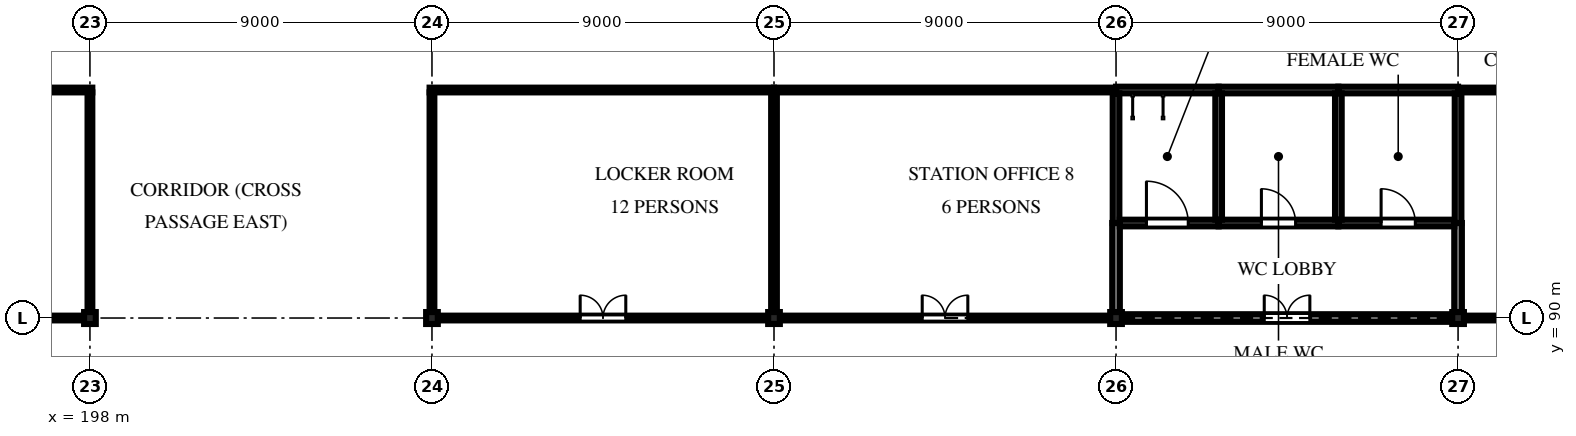
"""IFC4 building model, lengths in metres.
Left out: names, types, materials, properties, quantities, classifications, styles, units other than length and angle.
Written with IfcOpenShell. Run it as: python <this file> out.ifc"""

import sys

from ifc_helpers import new_model, si_unit, direction, frame, frame_2d, origin, origin_2d, place, context, subcontext, project, spatial, polyline, rectangle, i_section, outline, extrude, element, fill, save


model = new_model("IFC4")
c1 = context("Model", 3, precision=1e-05, world=origin(), true_north=direction((0.0, 1.0)))
c2 = subcontext(c1, "Body", "Model", "MODEL_VIEW")
j1 = project(units=[si_unit("LENGTHUNIT", "METRE"), si_unit("PLANEANGLEUNIT", "RADIAN")], contexts=[c1])
p1 = place(None, origin())
s1 = spatial("IfcSite", under=j1, at=p1, CompositionType="ELEMENT")
p2 = place(p1, origin())
s2 = spatial("IfcBuilding", under=s1, at=p2, CompositionType="ELEMENT")
p3 = place(p2, frame((0.0, 0.0, 7.5)))
s3 = spatial("IfcBuildingStorey", under=s2, at=p3, CompositionType="ELEMENT", Elevation=7.5)
for number, where, z_axis, x_axis in (
    (1, (198.0, 90.0, 0.0), (0.0, 0.0, 1.0), (1.0, 0.0, 0.0)),
    (2, (207.0, 90.0, 0.0), (0.0, 0.0, 1.0), (1.0, 0.0, 0.0)),
    (3, (216.0, 90.0, 0.0), (0.0, 0.0, 1.0), (1.0, 0.0, 0.0)),
    (4, (225.0, 90.0, 0.0), (0.0, 0.0, 1.0), (1.0, 0.0, 0.0)),
    (5, (234.0, 90.0, 0.0), (0.0, 0.0, 1.0), (1.0, 0.0, 0.0)),
):
    element("IfcColumn", number, at=place(p3, frame(where, z_axis=z_axis, x_axis=x_axis)), inside=s3, PredefinedType="COLUMN", context=c2, shape_type="SweptSolid", body=[
        extrude(i_section(OverallWidth=0.307, OverallDepth=0.314, WebThickness=0.012, FlangeThickness=0.019, FilletRadius=0.015, at=origin_2d()), origin(), (0.0, 0.0, 1.0), 4.2),
    ])
p4 = place(p3, frame((242.858, 96.0, 0.0), z_axis=(0.0, 0.0, 1.0), x_axis=(-1.0, 0.0, 0.0)))
e6 = element("IfcWall", 6, at=p4, inside=s3, PredefinedType="PARTITIONING", context=c2, shape_type="SweptSolid", body=[
    extrude(rectangle(XDim=8.858, YDim=0.125, at=frame_2d((4.429, 0.0))), origin(), (0.0, 0.0, 1.0), 3.307),
])
p5 = place(p3, frame((225.0, 96.0, 0.0), z_axis=(0.0, 0.0, 1.0), x_axis=(-1.0, 0.0, 0.0)))
e7 = element("IfcWall", 7, at=p5, inside=s3, PredefinedType="PARTITIONING", context=c2, shape_type="SweptSolid", body=[
    extrude(rectangle(XDim=9.0, YDim=0.125, at=frame_2d((4.5, 0.0))), origin(), (0.0, 0.0, 1.0), 3.307),
])
for number, where, z_axis, x_axis in (
    (8, (216.0, 96.0, 0.0), (0.0, 0.0, 1.0), (-1.0, 0.0, 0.0)),
    (9, (198.062, 96.0, 0.0), (0.0, 0.0, 1.0), (-1.0, 0.0, 0.0)),
):
    element("IfcWall", number, at=place(p3, frame(where, z_axis=z_axis, x_axis=x_axis)), inside=s3, PredefinedType="PARTITIONING", context=c2, shape_type="SweptSolid", body=[
        extrude(rectangle(XDim=9.062, YDim=0.125, at=frame_2d((4.531, 0.0))), origin(), (0.0, 0.0, 1.0), 3.307),
    ])
p6 = place(p3, frame((227.7, 96.0, 0.0), z_axis=(0.0, 0.0, 1.0), x_axis=(-1.0, 0.0, 0.0)))
e10 = element("IfcWall", 10, at=p6, inside=s3, PredefinedType="PARTITIONING", context=c2, shape_type="SweptSolid", body=[
    extrude(rectangle(XDim=2.7, YDim=0.175, at=frame_2d((1.35, 0.0))), origin(), (0.0, 0.0, 1.0), 3.307),
])
p7 = place(p3, frame((230.85, 96.0, 0.0), z_axis=(0.0, 0.0, 1.0), x_axis=(-1.0, 0.0, 0.0)))
e11 = element("IfcWall", 11, at=p7, inside=s3, PredefinedType="PARTITIONING", context=c2, shape_type="SweptSolid", body=[
    extrude(rectangle(XDim=3.15, YDim=0.175, at=frame_2d((1.575, 0.0))), origin(), (0.0, 0.0, 1.0), 3.307),
])
p8 = place(p3, frame((234.0, 96.0, 0.0), z_axis=(0.0, 0.0, 1.0), x_axis=(-1.0, 0.0, 0.0)))
e12 = element("IfcWall", 12, at=p8, inside=s3, PredefinedType="PARTITIONING", context=c2, shape_type="SweptSolid", body=[
    extrude(rectangle(XDim=3.15, YDim=0.175, at=frame_2d((1.575, 0.0))), origin(), (0.0, 0.0, 1.0), 3.307),
])
p9 = place(p3, frame((225.154, 90.0, 0.0), z_axis=(0.0, 0.0, 1.0), x_axis=(1.0, 0.0, 0.0)))
e13 = element("IfcWall", 13, at=p9, inside=s3, PredefinedType="PARTITIONING", context=c2, shape_type="SweptSolid", body=[
    extrude(rectangle(XDim=8.692, YDim=0.2, at=frame_2d((4.346, 0.0))), origin(), (0.0, 0.0, 1.0), 3.382),
])
p10 = place(p9, frame((3.746, 0.0, 0.0)))
e14 = element("IfcOpeningElement", 14, at=p10, cuts=e13, PredefinedType="OPENING", context=c2, shape_type="SweptSolid", body=[
    extrude(rectangle(XDim=1.2, YDim=2.1, at=frame_2d((0.6, 1.05))), frame((0.0, 0.11, 0.0), z_axis=(0.0, -1.0, 0.0), x_axis=(1.0, 0.0, 0.0)), (0.0, 0.0, 1.0), 0.22),
])
p11 = place(p3, frame((234.154, 90.0, 0.0), z_axis=(0.0, 0.0, 1.0), x_axis=(1.0, 0.0, 0.0)))
e15 = element("IfcWall", 15, at=p11, inside=s3, PredefinedType="PARTITIONING", context=c2, shape_type="SweptSolid", body=[
    extrude(rectangle(XDim=8.692, YDim=0.125, at=frame_2d((4.346, 0.0))), origin(), (0.0, 0.0, 1.0), 3.307),
])
p12 = place(p11, frame((3.746, 0.0, 0.0)))
e16 = element("IfcOpeningElement", 16, at=p12, cuts=e15, PredefinedType="OPENING", context=c2, shape_type="SweptSolid", body=[
    extrude(rectangle(XDim=1.2, YDim=2.1, at=frame_2d((0.6, 1.05))), frame((0.0, 0.073, 0.0), z_axis=(0.0, -1.0, 0.0), x_axis=(1.0, 0.0, 0.0)), (0.0, 0.0, 1.0), 0.145),
])
p13 = place(p3, frame((216.154, 90.0, 0.0), z_axis=(0.0, 0.0, 1.0), x_axis=(1.0, 0.0, 0.0)))
e17 = element("IfcWall", 17, at=p13, inside=s3, PredefinedType="PARTITIONING", context=c2, shape_type="SweptSolid", body=[
    extrude(rectangle(XDim=8.692, YDim=0.125, at=frame_2d((4.346, 0.0))), origin(), (0.0, 0.0, 1.0), 3.307),
])
p14 = place(p13, frame((3.746, 0.0, 0.0)))
e18 = element("IfcOpeningElement", 18, at=p14, cuts=e17, PredefinedType="OPENING", context=c2, shape_type="SweptSolid", body=[
    extrude(rectangle(XDim=1.2, YDim=2.1, at=frame_2d((0.6, 1.05))), frame((0.0, 0.073, 0.0), z_axis=(0.0, -1.0, 0.0), x_axis=(1.0, 0.0, 0.0)), (0.0, 0.0, 1.0), 0.145),
])
p15 = place(p3, frame((207.154, 90.0, 0.0), z_axis=(0.0, 0.0, 1.0), x_axis=(1.0, 0.0, 0.0)))
e19 = element("IfcWall", 19, at=p15, inside=s3, PredefinedType="PARTITIONING", context=c2, shape_type="SweptSolid", body=[
    extrude(rectangle(XDim=8.692, YDim=0.125, at=frame_2d((4.346, 0.0))), origin(), (0.0, 0.0, 1.0), 3.307),
])
p16 = place(p15, frame((3.746, 0.0, 0.0)))
e20 = element("IfcOpeningElement", 20, at=p16, cuts=e19, PredefinedType="OPENING", context=c2, shape_type="SweptSolid", body=[
    extrude(rectangle(XDim=1.2, YDim=2.1, at=frame_2d((0.6, 1.05))), frame((0.0, 0.073, 0.0), z_axis=(0.0, -1.0, 0.0), x_axis=(1.0, 0.0, 0.0)), (0.0, 0.0, 1.0), 0.145),
])
p17 = place(p3, frame((189.154, 90.0, 0.0), z_axis=(0.0, 0.0, 1.0), x_axis=(1.0, 0.0, 0.0)))
e21 = element("IfcWall", 21, at=p17, inside=s3, PredefinedType="PARTITIONING", context=c2, shape_type="SweptSolid", body=[
    extrude(rectangle(XDim=8.692, YDim=0.125, at=frame_2d((4.346, 0.0))), origin(), (0.0, 0.0, 1.0), 3.307),
])
p18 = place(p17, frame((3.746, 0.0, 0.0)))
e22 = element("IfcOpeningElement", 22, at=p18, cuts=e21, PredefinedType="OPENING", context=c2, shape_type="SweptSolid", body=[
    extrude(rectangle(XDim=1.2, YDim=2.1, at=frame_2d((0.6, 1.05))), frame((0.0, 0.073, 0.0), z_axis=(0.0, -1.0, 0.0), x_axis=(1.0, 0.0, 0.0)), (0.0, 0.0, 1.0), 0.145),
])
for number, where, z_axis, x_axis in (
    (23, (207.0, 95.938, 0.0), (0.0, 0.0, 1.0), (0.0, -1.0, 0.0)),
    (24, (198.0, 90.157, 0.0), (0.0, 0.0, 1.0), (0.0, 1.0, 0.0)),
):
    element("IfcWall", number, at=place(p3, frame(where, z_axis=z_axis, x_axis=x_axis)), inside=s3, PredefinedType="PARTITIONING", context=c2, shape_type="SweptSolid", body=[
        extrude(rectangle(XDim=5.78, YDim=0.125, at=frame_2d((2.89, 0.0))), origin(), (0.0, 0.0, 1.0), 3.307),
    ])
p19 = place(p3, frame((216.0, 95.938, 0.0), z_axis=(0.0, 0.0, 1.0), x_axis=(0.0, -1.0, 0.0)))
e25 = element("IfcWall", 25, at=p19, inside=s3, PredefinedType="PARTITIONING", context=c2, shape_type="SweptSolid", body=[
    extrude(rectangle(XDim=5.78, YDim=0.15, at=frame_2d((2.89, 0.0))), origin(), (0.0, 0.0, 1.0), 3.307),
])
p20 = place(p3, frame((225.0, 92.5, 0.0), z_axis=(0.0, 0.0, 1.0), x_axis=(0.0, -1.0, 0.0)))
e26 = element("IfcWall", 26, at=p20, inside=s3, PredefinedType="PARTITIONING", context=c2, shape_type="SweptSolid", body=[
    extrude(rectangle(XDim=2.343, YDim=0.2, at=frame_2d((1.171, 0.0))), origin(), (0.0, 0.0, 1.0), 3.382),
])
p21 = place(p3, frame((225.0, 95.913, 0.0), z_axis=(0.0, 0.0, 1.0), x_axis=(0.0, -1.0, 0.0)))
e27 = element("IfcWall", 27, at=p21, inside=s3, PredefinedType="PARTITIONING", context=c2, shape_type="SweptSolid", body=[
    extrude(rectangle(XDim=3.413, YDim=0.175, at=frame_2d((1.706, 0.0))), origin(), (0.0, 0.0, 1.0), 3.307),
])
p22 = place(p3, frame((234.0, 92.5, 0.0), z_axis=(0.0, 0.0, 1.0), x_axis=(0.0, -1.0, 0.0)))
e28 = element("IfcWall", 28, at=p22, inside=s3, PredefinedType="PARTITIONING", context=c2, shape_type="SweptSolid", body=[
    extrude(rectangle(XDim=2.343, YDim=0.2, at=frame_2d((1.171, 0.0))), origin(), (0.0, 0.0, 1.0), 3.382),
])
p23 = place(p3, frame((225.1, 92.5, 0.0), z_axis=(0.0, 0.0, 1.0), x_axis=(1.0, 0.0, 0.0)))
e29 = element("IfcWall", 29, at=p23, inside=s3, PredefinedType="PARTITIONING", context=c2, shape_type="SweptSolid", body=[
    extrude(rectangle(XDim=2.6, YDim=0.175, at=frame_2d((1.3, 0.0))), origin(), (0.0, 0.0, 1.0), 3.307),
])
p24 = place(p23, frame((0.7, 0.0, 0.0)))
e30 = element("IfcOpeningElement", 30, at=p24, cuts=e29, PredefinedType="OPENING", context=c2, shape_type="SweptSolid", body=[
    extrude(rectangle(XDim=1.1, YDim=2.1, at=frame_2d((0.55, 1.05))), frame((0.0, 0.097, 0.0), z_axis=(0.0, -1.0, 0.0), x_axis=(1.0, 0.0, 0.0)), (0.0, 0.0, 1.0), 0.195),
])
p25 = place(p3, frame((227.7, 92.5, 0.0), z_axis=(0.0, 0.0, 1.0), x_axis=(1.0, 0.0, 0.0)))
e31 = element("IfcWall", 31, at=p25, inside=s3, PredefinedType="PARTITIONING", context=c2, shape_type="SweptSolid", body=[
    extrude(rectangle(XDim=3.15, YDim=0.175, at=frame_2d((1.575, 0.0))), origin(), (0.0, 0.0, 1.0), 3.307),
])
p26 = place(p25, frame((1.125, 0.0, 0.0)))
e32 = element("IfcOpeningElement", 32, at=p26, cuts=e31, PredefinedType="OPENING", context=c2, shape_type="SweptSolid", body=[
    extrude(rectangle(XDim=0.9, YDim=2.1, at=frame_2d((0.45, 1.05))), frame((0.0, 0.097, 0.0), z_axis=(0.0, -1.0, 0.0), x_axis=(1.0, 0.0, 0.0)), (0.0, 0.0, 1.0), 0.195),
])
p27 = place(p3, frame((230.85, 92.5, 0.0), z_axis=(0.0, 0.0, 1.0), x_axis=(1.0, 0.0, 0.0)))
e33 = element("IfcWall", 33, at=p27, inside=s3, PredefinedType="PARTITIONING", context=c2, shape_type="SweptSolid", body=[
    extrude(rectangle(XDim=3.05, YDim=0.175, at=frame_2d((1.525, 0.0))), origin(), (0.0, 0.0, 1.0), 3.307),
])
p28 = place(p27, frame((1.125, 0.0, 0.0)))
e34 = element("IfcOpeningElement", 34, at=p28, cuts=e33, PredefinedType="OPENING", context=c2, shape_type="SweptSolid", body=[
    extrude(rectangle(XDim=0.9, YDim=2.1, at=frame_2d((0.45, 1.05))), frame((0.0, 0.097, 0.0), z_axis=(0.0, -1.0, 0.0), x_axis=(1.0, 0.0, 0.0)), (0.0, 0.0, 1.0), 0.195),
])
for number, where, z_axis, x_axis in (
    (35, (227.7, 95.913, 0.0), (0.0, 0.0, 1.0), (0.0, -1.0, 0.0)),
    (36, (230.85, 95.913, 0.0), (0.0, 0.0, 1.0), (0.0, -1.0, 0.0)),
):
    element("IfcWall", number, at=place(p3, frame(where, z_axis=z_axis, x_axis=x_axis)), inside=s3, PredefinedType="PARTITIONING", context=c2, shape_type="SweptSolid", body=[
        extrude(rectangle(XDim=3.325, YDim=0.175, at=frame_2d((1.663, 0.0))), origin(), (0.0, 0.0, 1.0), 3.307),
    ])
p29 = place(p3, frame((234.0, 95.913, 0.0), z_axis=(0.0, 0.0, 1.0), x_axis=(0.0, -1.0, 0.0)))
e37 = element("IfcWall", 37, at=p29, inside=s3, PredefinedType="PARTITIONING", context=c2, shape_type="SweptSolid", body=[
    extrude(rectangle(XDim=3.413, YDim=0.175, at=frame_2d((1.706, 0.0))), origin(), (0.0, 0.0, 1.0), 3.307),
])
p30 = place(p16, origin())
e38 = element("IfcDoor", 38, at=p30, inside=s3, OperationType="DOUBLE_DOOR_SINGLE_SWING", PredefinedType="DOOR", context=c2, shape_type="SweptSolid", body=[
    extrude(outline(polyline([(0.0, 0.0), (0.07, 0.0), (0.07, 2.03), (1.13, 2.03), (1.13, 0.0), (1.2, 0.0), (1.2, 2.1), (0.0, 2.1), (0.0, 0.0)])), frame((0.0, 0.025, 0.0), z_axis=(0.0, -1.0, 0.0), x_axis=(1.0, 0.0, 0.0)), (0.0, 0.0, 1.0), 0.05),
    extrude(outline(polyline([(0.074, 0.01), (0.597, 0.01), (0.597, 2.026), (0.074, 2.026), (0.074, 0.01)]), holes=[polyline([(0.178, 0.373), (0.492, 0.373), (0.492, 1.784), (0.178, 1.784), (0.178, 0.373)])]), frame((0.0, 0.017, 0.0), z_axis=(0.0, -1.0, 0.0), x_axis=(1.0, 0.0, 0.0)), (0.0, 0.0, 1.0), 0.035),
    extrude(rectangle(XDim=0.314, YDim=1.411, at=frame_2d((0.335, 1.079))), frame((0.0, 0.009, 0.0), z_axis=(0.0, -1.0, 0.0), x_axis=(1.0, 0.0, 0.0)), (0.0, 0.0, 1.0), 0.017),
    extrude(outline(polyline([(0.603, 0.01), (1.126, 0.01), (1.126, 2.026), (0.603, 2.026), (0.603, 0.01)]), holes=[polyline([(0.708, 0.373), (1.021, 0.373), (1.021, 1.784), (0.708, 1.784), (0.708, 0.373)])]), frame((0.0, 0.017, 0.0), z_axis=(0.0, -1.0, 0.0), x_axis=(1.0, 0.0, 0.0)), (0.0, 0.0, 1.0), 0.035),
    extrude(rectangle(XDim=0.314, YDim=1.411, at=frame_2d((0.865, 1.079))), frame((0.0, 0.009, 0.0), z_axis=(0.0, -1.0, 0.0), x_axis=(1.0, 0.0, 0.0)), (0.0, 0.0, 1.0), 0.017),
])
fill(e20, e38)
p31 = place(p14, origin())
e39 = element("IfcDoor", 39, at=p31, inside=s3, OperationType="DOUBLE_DOOR_SINGLE_SWING", PredefinedType="DOOR", context=c2, shape_type="SweptSolid", body=[
    extrude(outline(polyline([(0.0, 0.0), (0.07, 0.0), (0.07, 2.03), (1.13, 2.03), (1.13, 0.0), (1.2, 0.0), (1.2, 2.1), (0.0, 2.1), (0.0, 0.0)])), frame((0.0, 0.025, 0.0), z_axis=(0.0, -1.0, 0.0), x_axis=(1.0, 0.0, 0.0)), (0.0, 0.0, 1.0), 0.05),
    extrude(outline(polyline([(0.074, 0.01), (0.597, 0.01), (0.597, 2.026), (0.074, 2.026), (0.074, 0.01)]), holes=[polyline([(0.178, 0.373), (0.492, 0.373), (0.492, 1.784), (0.178, 1.784), (0.178, 0.373)])]), frame((0.0, 0.017, 0.0), z_axis=(0.0, -1.0, 0.0), x_axis=(1.0, 0.0, 0.0)), (0.0, 0.0, 1.0), 0.035),
    extrude(rectangle(XDim=0.314, YDim=1.411, at=frame_2d((0.335, 1.079))), frame((0.0, 0.009, 0.0), z_axis=(0.0, -1.0, 0.0), x_axis=(1.0, 0.0, 0.0)), (0.0, 0.0, 1.0), 0.017),
    extrude(outline(polyline([(0.603, 0.01), (1.126, 0.01), (1.126, 2.026), (0.603, 2.026), (0.603, 0.01)]), holes=[polyline([(0.708, 0.373), (1.021, 0.373), (1.021, 1.784), (0.708, 1.784), (0.708, 0.373)])]), frame((0.0, 0.017, 0.0), z_axis=(0.0, -1.0, 0.0), x_axis=(1.0, 0.0, 0.0)), (0.0, 0.0, 1.0), 0.035),
    extrude(rectangle(XDim=0.314, YDim=1.411, at=frame_2d((0.865, 1.079))), frame((0.0, 0.009, 0.0), z_axis=(0.0, -1.0, 0.0), x_axis=(1.0, 0.0, 0.0)), (0.0, 0.0, 1.0), 0.017),
])
fill(e18, e39)
p32 = place(p10, origin())
e40 = element("IfcDoor", 40, at=p32, inside=s3, OperationType="DOUBLE_DOOR_SINGLE_SWING", PredefinedType="DOOR", context=c2, shape_type="SweptSolid", body=[
    extrude(outline(polyline([(0.0, 0.0), (0.07, 0.0), (0.07, 2.03), (1.13, 2.03), (1.13, 0.0), (1.2, 0.0), (1.2, 2.1), (0.0, 2.1), (0.0, 0.0)])), frame((0.0, 0.025, 0.0), z_axis=(0.0, -1.0, 0.0), x_axis=(1.0, 0.0, 0.0)), (0.0, 0.0, 1.0), 0.05),
    extrude(outline(polyline([(0.074, 0.01), (0.597, 0.01), (0.597, 2.026), (0.074, 2.026), (0.074, 0.01)]), holes=[polyline([(0.178, 0.373), (0.492, 0.373), (0.492, 1.784), (0.178, 1.784), (0.178, 0.373)])]), frame((0.0, 0.017, 0.0), z_axis=(0.0, -1.0, 0.0), x_axis=(1.0, 0.0, 0.0)), (0.0, 0.0, 1.0), 0.035),
    extrude(rectangle(XDim=0.314, YDim=1.411, at=frame_2d((0.335, 1.079))), frame((0.0, 0.009, 0.0), z_axis=(0.0, -1.0, 0.0), x_axis=(1.0, 0.0, 0.0)), (0.0, 0.0, 1.0), 0.017),
    extrude(outline(polyline([(0.603, 0.01), (1.126, 0.01), (1.126, 2.026), (0.603, 2.026), (0.603, 0.01)]), holes=[polyline([(0.708, 0.373), (1.021, 0.373), (1.021, 1.784), (0.708, 1.784), (0.708, 0.373)])]), frame((0.0, 0.017, 0.0), z_axis=(0.0, -1.0, 0.0), x_axis=(1.0, 0.0, 0.0)), (0.0, 0.0, 1.0), 0.035),
    extrude(rectangle(XDim=0.314, YDim=1.411, at=frame_2d((0.865, 1.079))), frame((0.0, 0.009, 0.0), z_axis=(0.0, -1.0, 0.0), x_axis=(1.0, 0.0, 0.0)), (0.0, 0.0, 1.0), 0.017),
])
fill(e14, e40)
p33 = place(p24, origin())
e41 = element("IfcDoor", 41, at=p33, inside=s3, OperationType="SINGLE_SWING_LEFT", PredefinedType="DOOR", context=c2, shape_type="SweptSolid", body=[
    extrude(outline(polyline([(0.0, 0.0), (0.07, 0.0), (0.07, 2.03), (1.03, 2.03), (1.03, 0.0), (1.1, 0.0), (1.1, 2.1), (0.0, 2.1), (0.0, 0.0)])), frame((0.0, 0.025, 0.0), z_axis=(0.0, -1.0, 0.0), x_axis=(1.0, 0.0, 0.0)), (0.0, 0.0, 1.0), 0.05),
    extrude(outline(polyline([(0.074, 0.01), (1.026, 0.01), (1.026, 2.026), (0.074, 2.026), (0.074, 0.01)]), holes=[polyline([(0.194, 0.16), (0.906, 0.16), (0.906, 1.01), (0.194, 1.01), (0.194, 0.16)]), polyline([(0.4, 1.16), (0.7, 1.16), (0.7, 1.76), (0.4, 1.76), (0.4, 1.16)])]), frame((0.0, 0.017, 0.0), z_axis=(0.0, -1.0, 0.0), x_axis=(1.0, 0.0, 0.0)), (0.0, 0.0, 1.0), 0.035),
    extrude(rectangle(XDim=0.712, YDim=0.85, at=frame_2d((0.55, 0.585))), frame((0.0, 0.009, 0.0), z_axis=(0.0, -1.0, 0.0), x_axis=(1.0, 0.0, 0.0)), (0.0, 0.0, 1.0), 0.017),
    extrude(rectangle(XDim=0.3, YDim=0.6, at=frame_2d((0.55, 1.46))), frame((0.0, 0.006, 0.0), z_axis=(0.0, -1.0, 0.0), x_axis=(1.0, 0.0, 0.0)), (0.0, 0.0, 1.0), 0.012),
])
fill(e30, e41)
p34 = place(p26, origin())
e42 = element("IfcDoor", 42, at=p34, inside=s3, OperationType="SINGLE_SWING_LEFT", PredefinedType="DOOR", context=c2, shape_type="SweptSolid", body=[
    extrude(outline(polyline([(0.0, 0.0), (0.07, 0.0), (0.07, 2.03), (0.83, 2.03), (0.83, 0.0), (0.9, 0.0), (0.9, 2.1), (0.0, 2.1), (0.0, 0.0)])), frame((0.0, 0.025, 0.0), z_axis=(0.0, -1.0, 0.0), x_axis=(1.0, 0.0, 0.0)), (0.0, 0.0, 1.0), 0.05),
    extrude(outline(polyline([(0.074, 0.01), (0.826, 0.01), (0.826, 2.026), (0.074, 2.026), (0.074, 0.01)]), holes=[polyline([(0.194, 0.16), (0.706, 0.16), (0.706, 1.01), (0.194, 1.01), (0.194, 0.16)]), polyline([(0.3, 1.16), (0.6, 1.16), (0.6, 1.76), (0.3, 1.76), (0.3, 1.16)])]), frame((0.0, 0.017, 0.0), z_axis=(0.0, -1.0, 0.0), x_axis=(1.0, 0.0, 0.0)), (0.0, 0.0, 1.0), 0.035),
    extrude(rectangle(XDim=0.512, YDim=0.85, at=frame_2d((0.45, 0.585))), frame((0.0, 0.009, 0.0), z_axis=(0.0, -1.0, 0.0), x_axis=(1.0, 0.0, 0.0)), (0.0, 0.0, 1.0), 0.017),
    extrude(rectangle(XDim=0.3, YDim=0.6, at=frame_2d((0.45, 1.46))), frame((0.0, 0.006, 0.0), z_axis=(0.0, -1.0, 0.0), x_axis=(1.0, 0.0, 0.0)), (0.0, 0.0, 1.0), 0.012),
])
fill(e32, e42)
p35 = place(p28, origin())
e43 = element("IfcDoor", 43, at=p35, inside=s3, OperationType="SINGLE_SWING_LEFT", PredefinedType="DOOR", context=c2, shape_type="SweptSolid", body=[
    extrude(outline(polyline([(0.0, 0.0), (0.07, 0.0), (0.07, 2.03), (0.83, 2.03), (0.83, 0.0), (0.9, 0.0), (0.9, 2.1), (0.0, 2.1), (0.0, 0.0)])), frame((0.0, 0.025, 0.0), z_axis=(0.0, -1.0, 0.0), x_axis=(1.0, 0.0, 0.0)), (0.0, 0.0, 1.0), 0.05),
    extrude(outline(polyline([(0.074, 0.01), (0.826, 0.01), (0.826, 2.026), (0.074, 2.026), (0.074, 0.01)]), holes=[polyline([(0.194, 0.16), (0.706, 0.16), (0.706, 1.01), (0.194, 1.01), (0.194, 0.16)]), polyline([(0.3, 1.16), (0.6, 1.16), (0.6, 1.76), (0.3, 1.76), (0.3, 1.16)])]), frame((0.0, 0.017, 0.0), z_axis=(0.0, -1.0, 0.0), x_axis=(1.0, 0.0, 0.0)), (0.0, 0.0, 1.0), 0.035),
    extrude(rectangle(XDim=0.512, YDim=0.85, at=frame_2d((0.45, 0.585))), frame((0.0, 0.009, 0.0), z_axis=(0.0, -1.0, 0.0), x_axis=(1.0, 0.0, 0.0)), (0.0, 0.0, 1.0), 0.017),
    extrude(rectangle(XDim=0.3, YDim=0.6, at=frame_2d((0.45, 1.46))), frame((0.0, 0.006, 0.0), z_axis=(0.0, -1.0, 0.0), x_axis=(1.0, 0.0, 0.0)), (0.0, 0.0, 1.0), 0.012),
])
fill(e34, e43)
save(model, sys.argv[1])
